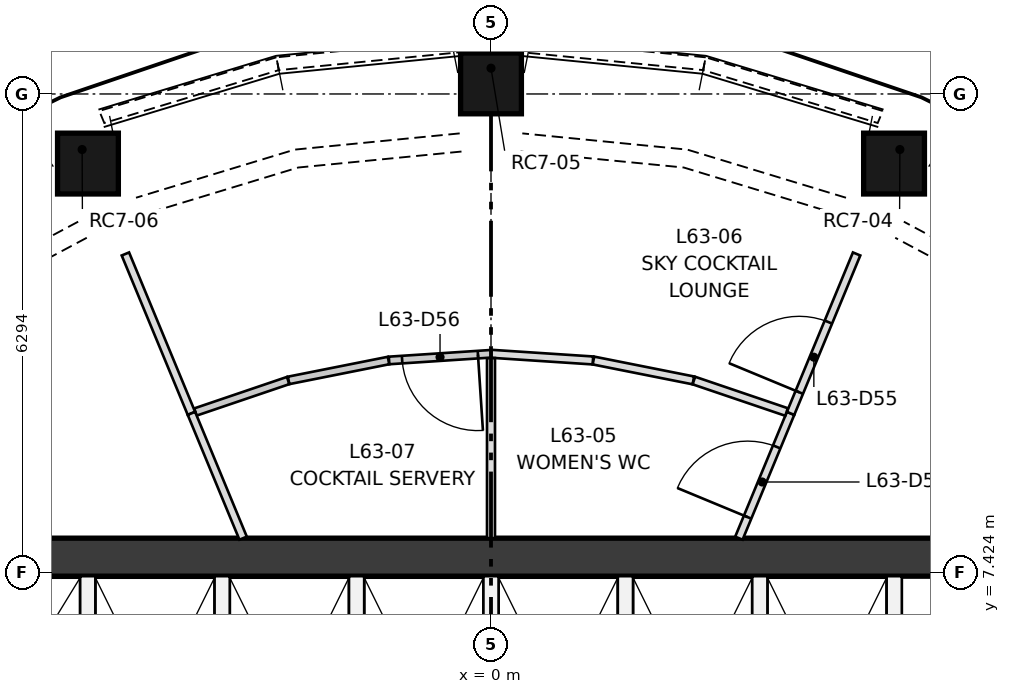
"""IFC4 building model, lengths in metres.
Left out: names, types, materials, properties, quantities, classifications, styles, units other than length and angle.
Written with IfcOpenShell. Run it as: python <this file> out.ifc"""

import sys

from ifc_helpers import new_model, si_unit, direction, frame, frame_2d, origin, origin_2d, place, context, subcontext, project, spatial, polyline, rectangle, outline, extrude, element, fill, save


model = new_model("IFC4")
c1 = context("Model", 3, precision=1e-05, world=origin(), true_north=direction((0.0, 1.0)))
c2 = subcontext(c1, "Body", "Model", "MODEL_VIEW")
j1 = project(units=[si_unit("LENGTHUNIT", "METRE"), si_unit("PLANEANGLEUNIT", "RADIAN")], contexts=[c1])
p1 = place(None, origin())
s1 = spatial("IfcSite", under=j1, at=p1, CompositionType="ELEMENT")
p2 = place(p1, origin())
s2 = spatial("IfcBuilding", under=s1, at=p2, CompositionType="ELEMENT")
p3 = place(p2, frame((0.0, 0.0, 231.2)))
s3 = spatial("IfcBuildingStorey", under=s2, at=p3, CompositionType="ELEMENT", Elevation=231.2)
p4 = place(p3, frame((5.379, 12.987, 0.5), z_axis=(0.0, 0.0, 1.0), x_axis=(0.923896423382, -0.382642651649, 0.0)))
e1 = element("IfcColumn", 1, at=p4, inside=s3, PredefinedType="COLUMN", context=c2, shape_type="SweptSolid", body=[
    extrude(rectangle(XDim=0.8, YDim=0.8, at=origin_2d()), origin(), (0.0, -0.275, 0.962), 3.328),
])
p5 = place(p3, frame((0.0, 14.057, 0.5), z_axis=(0.0, 0.0, 1.0), x_axis=(1.0, 0.0, 0.0)))
e2 = element("IfcColumn", 2, at=p5, inside=s3, PredefinedType="COLUMN", context=c2, shape_type="SweptSolid", body=[
    extrude(rectangle(XDim=0.8, YDim=0.8, at=origin_2d()), origin(), (0.0, -0.275, 0.962), 3.328),
])
p6 = place(p3, frame((-5.379, 12.987, 0.5), z_axis=(0.0, 0.0, 1.0), x_axis=(0.923896423382, 0.382642651649, 0.0)))
e3 = element("IfcColumn", 3, at=p6, inside=s3, PredefinedType="COLUMN", context=c2, shape_type="SweptSolid", body=[
    extrude(rectangle(XDim=0.8, YDim=0.8, at=origin_2d()), origin(), (0.0, -0.275, 0.962), 3.328),
])
p7 = place(p3, frame((-7.874, 7.624, 0.0), z_axis=(0.0, 0.0, 1.0), x_axis=(1.0, 0.0, 0.0)))
e4 = element("IfcWall", 4, at=p7, inside=s3, PredefinedType="SHEAR", context=c2, shape_type="SweptSolid", body=[
    extrude(rectangle(XDim=15.748, YDim=0.5, at=frame_2d((7.874, 0.0))), origin(), (0.0, 0.0, 1.0), 3.3),
])
for number, where, z_axis, x_axis in (
    (5, (-5.305, 4.174, 0.0), (0.0, 0.0, 1.0), (0.0, 1.0, 0.0)),
    (6, (-3.537, 4.174, 0.0), (0.0, 0.0, 1.0), (0.0, 1.0, 0.0)),
    (7, (-1.769, 4.174, 0.0), (0.0, 0.0, 1.0), (0.0, 1.0, 0.0)),
    (8, (0.0, 4.174, 0.0), (0.0, 0.0, 1.0), (0.0, 1.0, 0.0)),
    (9, (1.769, 4.174, 0.0), (0.0, 0.0, 1.0), (0.0, 1.0, 0.0)),
    (10, (3.537, 4.174, 0.0), (0.0, 0.0, 1.0), (0.0, 1.0, 0.0)),
    (11, (5.305, 4.174, 0.0), (0.0, 0.0, 1.0), (0.0, 1.0, 0.0)),
):
    element("IfcWall", number, at=place(p3, frame(where, z_axis=z_axis, x_axis=x_axis)), inside=s3, PredefinedType="PARTITIONING", context=c2, shape_type="SweptSolid", body=[
        extrude(rectangle(XDim=3.2, YDim=0.2, at=frame_2d((1.6, 0.0))), origin(), (0.0, 0.0, 1.0), 3.3),
    ])
p8 = place(p3, frame((8.044, 12.038, 0.0), z_axis=(0.441126603603, 0.824402860411, 0.354636776631), x_axis=(-0.881712517728, 0.471787066311, 1.195964e-05)))
e12 = element("IfcWall", 12, at=p8, inside=s3, PredefinedType="SOLIDWALL", context=c2, shape_type="SweptSolid", body=[
    extrude(outline(polyline([(0.0, 0.0), (2.434, 5.551e-17), (2.417, 0.481), (0.017, 0.481), (0.0, 0.0)])), origin(), (0.0, 0.0, -1.0), 0.3),
])
p9 = place(p3, frame((5.154, 13.494, 0.0), z_axis=(0.271094631402, 0.894631168658, 0.355165838574), x_axis=(-0.957026634075, 0.290000037325, 4.815507e-06)))
e13 = element("IfcWall", 13, at=p9, inside=s3, PredefinedType="SOLIDWALL", context=c2, shape_type="SweptSolid", body=[
    extrude(outline(polyline([(0.0, 0.0), (2.434, 0.0), (2.417, 0.481), (0.017, 0.481), (0.0, 0.0)])), origin(), (0.0, 0.0, -1.0), 0.3),
])
p10 = place(p3, frame((2.824, 14.2, 0.0), z_axis=(0.091755306795, 0.93035064291, 0.355005133642), x_axis=(-0.995172119915, 0.098145054237, 8.475565e-06)))
e14 = element("IfcWall", 14, at=p10, inside=s3, PredefinedType="SOLIDWALL", context=c2, shape_type="SweptSolid", body=[
    extrude(outline(polyline([(0.0, 0.0), (2.433, 1.388e-17), (2.417, 0.481), (0.017, 0.481), (0.0, 0.0)])), origin(), (0.0, 0.0, -1.0), 0.3),
])
p11 = place(p3, frame((-0.403, 14.439, 0.0), z_axis=(-0.091755306795, 0.93035064291, 0.355005133642), x_axis=(-0.995172119915, -0.098145054237, -8.475565e-06)))
e15 = element("IfcWall", 15, at=p11, inside=s3, PredefinedType="SOLIDWALL", context=c2, shape_type="SweptSolid", body=[
    extrude(outline(polyline([(0.0, 0.0), (2.433, -1.388e-17), (2.417, 0.481), (0.017, 0.481), (0.0, 0.0)])), origin(), (0.0, 0.0, -1.0), 0.3),
])
p12 = place(p3, frame((-2.824, 14.2, 0.0), z_axis=(-0.271074750296, 0.894721380135, 0.354953703573), x_axis=(-0.957038883806, -0.289959608839, 1.1226683e-05)))
e16 = element("IfcWall", 16, at=p12, inside=s3, PredefinedType="SOLIDWALL", context=c2, shape_type="SweptSolid", body=[
    extrude(outline(polyline([(0.0, 0.0), (2.434, -5.551e-17), (2.417, 0.481), (0.017, 0.481), (0.0, 0.0)])), origin(), (0.0, 0.0, -1.0), 0.3),
])
p13 = place(p3, frame((-5.898, 13.186, 0.0), z_axis=(-0.441016524886, 0.824332600798, 0.35493687895), x_axis=(-0.881740708382, -0.471734377661, 1.0715603e-05)))
e17 = element("IfcWall", 17, at=p13, inside=s3, PredefinedType="SOLIDWALL", context=c2, shape_type="SweptSolid", body=[
    extrude(outline(polyline([(0.0, 0.0), (2.434, 0.0), (2.417, 0.481), (0.017, 0.481), (0.0, 0.0)])), origin(), (0.0, 0.0, -1.0), 0.3),
])
p14 = place(p3, frame((3.261, 7.874, 0.0), z_axis=(0.0, 0.0, 1.0), x_axis=(0.382683383062, 0.923879552933, 0.0)))
e18 = element("IfcWall", 18, at=p14, inside=s3, PredefinedType="PARTITIONING", context=c2, shape_type="SweptSolid", body=[
    extrude(rectangle(XDim=1.777, YDim=0.105, at=frame_2d((0.889, 0.0))), origin(), (0.0, 0.0, 1.0), 3.3),
])
p15 = place(p14, frame((0.3, 0.0, 0.0)))
e19 = element("IfcOpeningElement", 19, at=p15, cuts=e18, PredefinedType="OPENING", context=c2, shape_type="SweptSolid", body=[
    extrude(rectangle(XDim=1.0, YDim=2.1, at=frame_2d((0.5, 1.05))), frame((0.0, 0.062, 0.0), z_axis=(0.0, -1.0, 0.0), x_axis=(1.0, 0.0, 0.0)), (0.0, 0.0, 1.0), 0.125),
])
p16 = place(p3, frame((3.942, 9.516, 0.0), z_axis=(0.0, 0.0, 1.0), x_axis=(0.382674756939, 0.923883125943, 0.0)))
e20 = element("IfcWall", 20, at=p16, inside=s3, PredefinedType="PARTITIONING", context=c2, shape_type="SweptSolid", body=[
    extrude(rectangle(XDim=2.27, YDim=0.105, at=frame_2d((1.135, 0.0))), origin(), (0.0, 0.0, 1.0), 3.3),
])
p17 = place(p16, frame((0.3, 0.0, 0.0)))
e21 = element("IfcOpeningElement", 21, at=p17, cuts=e20, PredefinedType="OPENING", context=c2, shape_type="SweptSolid", body=[
    extrude(rectangle(XDim=1.0, YDim=2.1, at=frame_2d((0.5, 1.05))), frame((0.0, 0.062, 0.0), z_axis=(0.0, -1.0, 0.0), x_axis=(1.0, 0.0, 0.0)), (0.0, 0.0, 1.0), 0.125),
])
p18 = place(p3, frame((0.0, 10.3, 0.0), z_axis=(0.0, 0.0, 1.0), x_axis=(0.997859281755, -0.065397659099, 0.0)))
e22 = element("IfcWall", 22, at=p18, inside=s3, PredefinedType="PARTITIONING", context=c2, shape_type="SweptSolid", body=[
    extrude(rectangle(XDim=1.344, YDim=0.105, at=frame_2d((0.672, 0.0))), origin(), (0.0, 0.0, 1.0), 3.3),
])
p19 = place(p3, frame((1.348, 10.211, 0.0), z_axis=(0.0, 0.0, 1.0), x_axis=(0.9807833349, -0.195100102466, 0.0)))
e23 = element("IfcWall", 23, at=p19, inside=s3, PredefinedType="PARTITIONING", context=c2, shape_type="SweptSolid", body=[
    extrude(rectangle(XDim=1.34, YDim=0.105, at=frame_2d((0.67, 0.0))), origin(), (0.0, 0.0, 1.0), 3.3),
])
p20 = place(p3, frame((2.669, 9.948, 0.0), z_axis=(0.0, 0.0, 1.0), x_axis=(0.946885945971, -0.321569596389, 0.0)))
e24 = element("IfcWall", 24, at=p20, inside=s3, PredefinedType="PARTITIONING", context=c2, shape_type="SweptSolid", body=[
    extrude(rectangle(XDim=1.288, YDim=0.105, at=frame_2d((0.644, 0.0))), origin(), (0.0, 0.0, 1.0), 3.3),
])
p21 = place(p3, frame((0.0, 7.874, 0.0), z_axis=(0.0, 0.0, 1.0), x_axis=(0.0, 1.0, 0.0)))
e25 = element("IfcWall", 25, at=p21, inside=s3, PredefinedType="PARTITIONING", context=c2, shape_type="SweptSolid", body=[
    extrude(rectangle(XDim=2.37, YDim=0.105, at=frame_2d((1.185, 0.0))), origin(), (0.0, 0.0, 1.0), 3.3),
])
p22 = place(p3, frame((-2.669, 9.948, 0.0), z_axis=(0.0, 0.0, 1.0), x_axis=(-0.946925137773, -0.321454170069, 0.0)))
e26 = element("IfcWall", 26, at=p22, inside=s3, PredefinedType="PARTITIONING", context=c2, shape_type="SweptSolid", body=[
    extrude(rectangle(XDim=1.288, YDim=0.1, at=frame_2d((0.644, 0.0))), origin(), (0.0, 0.0, 1.0), 3.3),
])
p23 = place(p3, frame((-1.348, 10.211, 0.0), z_axis=(0.0, 0.0, 1.0), x_axis=(-0.980797195444, -0.195030411497, 0.0)))
e27 = element("IfcWall", 27, at=p23, inside=s3, PredefinedType="PARTITIONING", context=c2, shape_type="SweptSolid", body=[
    extrude(rectangle(XDim=1.341, YDim=0.1, at=frame_2d((0.67, 0.0))), origin(), (0.0, 0.0, 1.0), 3.3),
])
p24 = place(p3, frame((0.0, 10.3, 0.0), z_axis=(0.0, 0.0, 1.0), x_axis=(-0.997859281755, -0.065397659099, 0.0)))
e28 = element("IfcWall", 28, at=p24, inside=s3, PredefinedType="PARTITIONING", context=c2, shape_type="SweptSolid", body=[
    extrude(rectangle(XDim=1.344, YDim=0.1, at=frame_2d((0.672, 0.0))), origin(), (0.0, 0.0, 1.0), 3.3),
])
p25 = place(p24, frame((0.172, 0.0, 0.0)))
e29 = element("IfcOpeningElement", 29, at=p25, cuts=e28, PredefinedType="OPENING", context=c2, shape_type="SweptSolid", body=[
    extrude(rectangle(XDim=1.0, YDim=2.1, at=frame_2d((0.5, 1.05))), frame((0.0, 0.06, 0.0), z_axis=(0.0, -1.0, 0.0), x_axis=(1.0, 0.0, 0.0)), (0.0, 0.0, 1.0), 0.12),
])
p26 = place(p3, frame((-3.942, 9.516, 0.0), z_axis=(0.0, 0.0, 1.0), x_axis=(-0.382674756939, 0.923883125943, 0.0)))
e30 = element("IfcWall", 30, at=p26, inside=s3, PredefinedType="PARTITIONING", context=c2, shape_type="SweptSolid", body=[
    extrude(rectangle(XDim=2.27, YDim=0.105, at=frame_2d((1.135, 0.0))), origin(), (0.0, 0.0, 1.0), 3.3),
])
p27 = place(p3, frame((-3.261, 7.874, 0.0), z_axis=(0.0, 0.0, 1.0), x_axis=(-0.382683383062, 0.923879552933, 0.0)))
e31 = element("IfcWall", 31, at=p27, inside=s3, PredefinedType="PARTITIONING", context=c2, shape_type="SweptSolid", body=[
    extrude(rectangle(XDim=1.777, YDim=0.105, at=frame_2d((0.889, 0.0))), origin(), (0.0, 0.0, 1.0), 3.3),
])
p28 = place(p15, origin())
e32 = element("IfcDoor", 32, at=p28, inside=s3, OperationType="SINGLE_SWING_LEFT", PredefinedType="DOOR", context=c2, shape_type="SweptSolid", body=[
    extrude(rectangle(XDim=1.0, YDim=2.1, at=frame_2d((0.5, 1.05))), frame((0.0, 0.025, 0.0), z_axis=(0.0, -1.0, 0.0), x_axis=(1.0, 0.0, 0.0)), (0.0, 0.0, 1.0), 0.05),
])
fill(e19, e32)
p29 = place(p17, origin())
e33 = element("IfcDoor", 33, at=p29, inside=s3, OperationType="SINGLE_SWING_LEFT", PredefinedType="DOOR", context=c2, shape_type="SweptSolid", body=[
    extrude(rectangle(XDim=1.0, YDim=2.1, at=frame_2d((0.5, 1.05))), frame((0.0, 0.025, 0.0), z_axis=(0.0, -1.0, 0.0), x_axis=(1.0, 0.0, 0.0)), (0.0, 0.0, 1.0), 0.05),
])
fill(e21, e33)
p30 = place(p25, origin())
e34 = element("IfcDoor", 34, at=p30, inside=s3, OperationType="SINGLE_SWING_LEFT", PredefinedType="DOOR", context=c2, shape_type="SweptSolid", body=[
    extrude(rectangle(XDim=1.0, YDim=2.1, at=frame_2d((0.5, 1.05))), frame((0.0, 0.025, 0.0), z_axis=(0.0, -1.0, 0.0), x_axis=(1.0, 0.0, 0.0)), (0.0, 0.0, 1.0), 0.05),
])
fill(e29, e34)
save(model, sys.argv[1])
